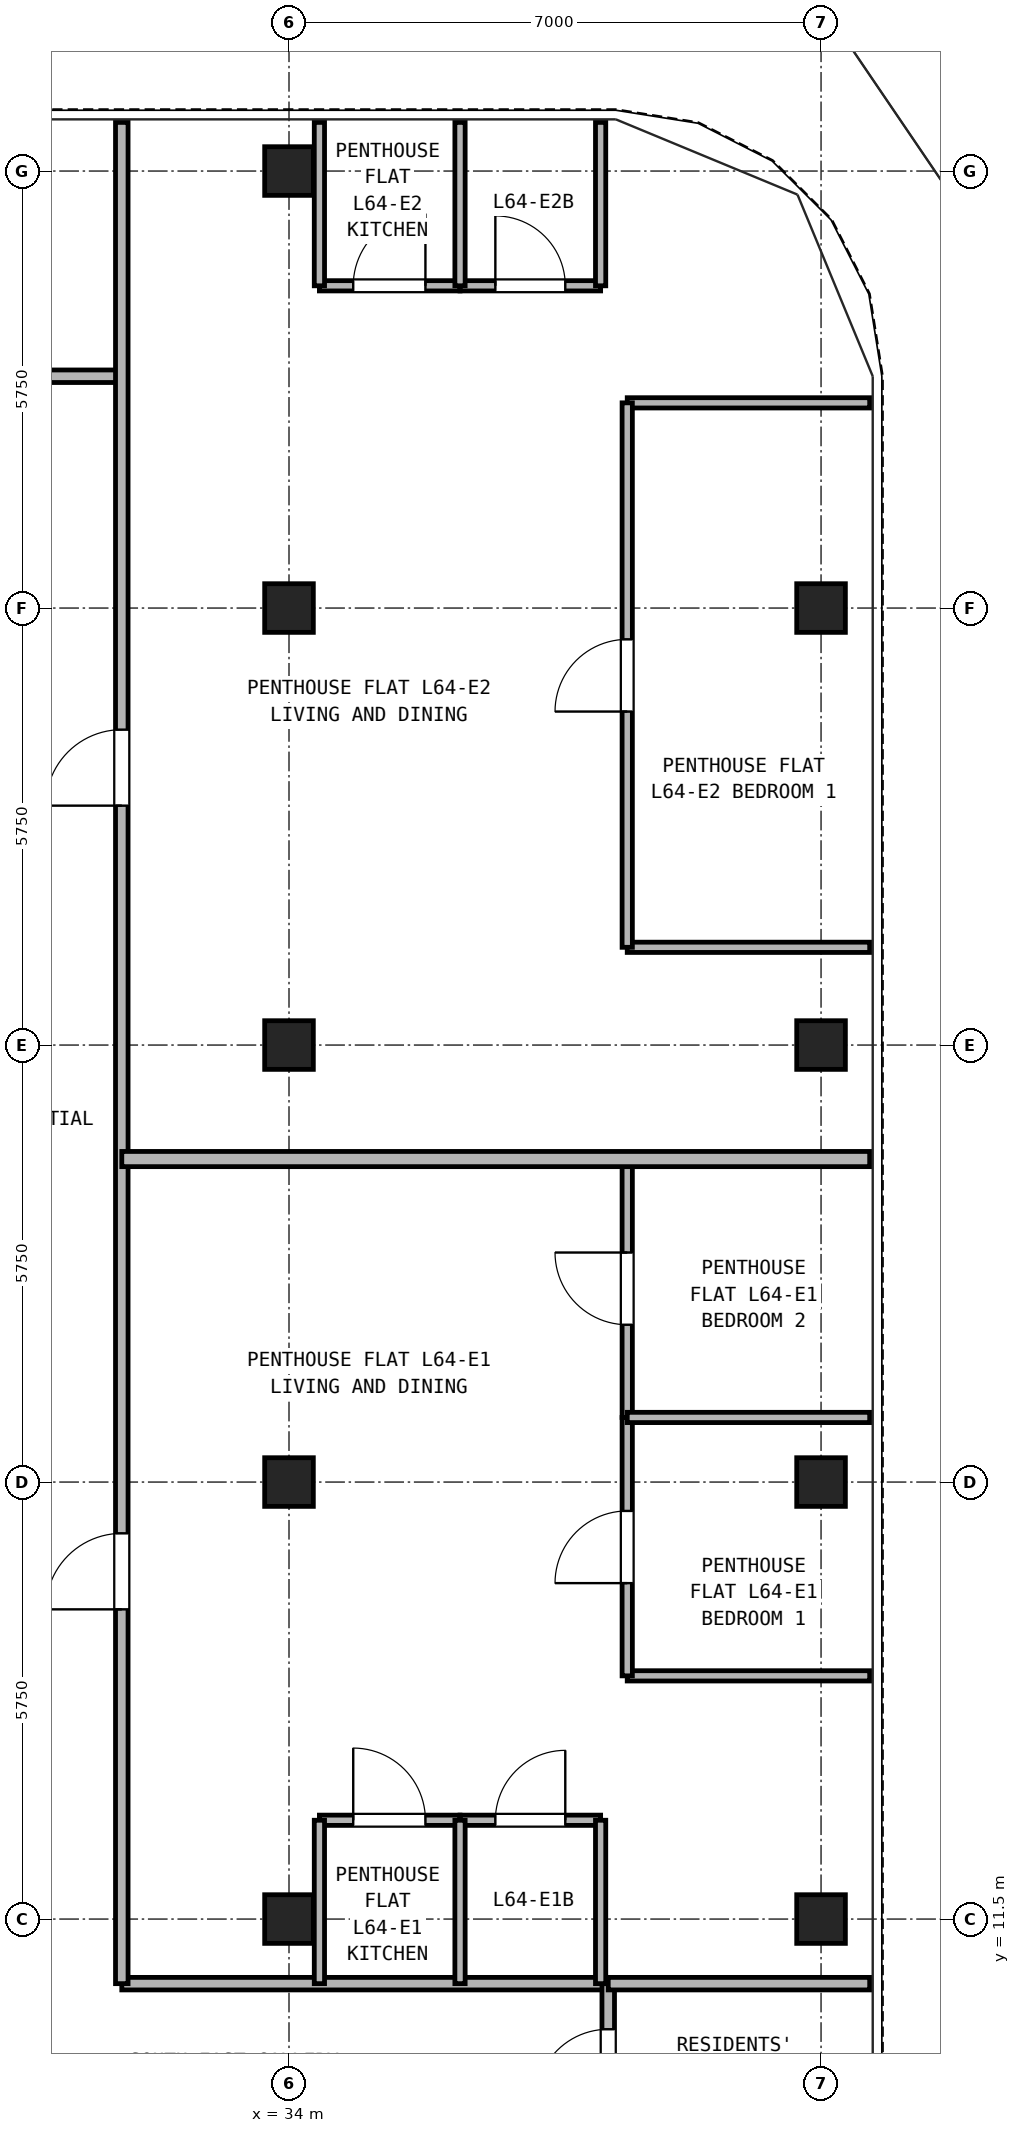
"""IFC4 building model, lengths in metres.
Left out: names, types, materials, properties, quantities, classifications, styles, units other than length and angle.
Written with IfcOpenShell. Run it as: python <this file> out.ifc"""

import sys

from ifc_helpers import new_model, si_unit, direction, frame, frame_2d, origin, origin_2d, place, context, subcontext, project, spatial, rectangle, hollow_rectangle, extrude, source, transform, mapped, element, fill, save


model = new_model("IFC4")
c1 = context("Model", 3, precision=1e-05, world=origin(), true_north=direction((0.0, 1.0)))
c2 = subcontext(c1, "Body", "Model", "MODEL_VIEW")
j1 = project(units=[si_unit("LENGTHUNIT", "METRE"), si_unit("PLANEANGLEUNIT", "RADIAN")], contexts=[c1])
p1 = place(None, origin())
s1 = spatial("IfcSite", under=j1, at=p1, CompositionType="ELEMENT")
p2 = place(p1, origin())
s2 = spatial("IfcBuilding", under=s1, at=p2, CompositionType="ELEMENT")
p3 = place(p2, frame((0.0, 0.0, 226.5)))
s3 = spatial("IfcBuildingStorey", under=s2, at=p3, CompositionType="ELEMENT", Elevation=226.5)
m1 = source(origin(), c2, "Body", "SweptSolid", [
    extrude(hollow_rectangle(XDim=0.64, YDim=0.64, WallThickness=0.035, at=origin_2d()), origin(), (0.0, 0.0, 1.0), 2.98),
])
for number, where, z_axis, x_axis in (
    (1, (34.0, 34.5, 0.0), (0.0, 0.0, 1.0), (1.0, 0.0, 0.0)),
    (2, (41.0, 11.5, 0.0), (0.0, 0.0, 1.0), (1.0, 0.0, 0.0)),
    (3, (41.0, 17.25, 0.0), (0.0, 0.0, 1.0), (1.0, 0.0, 0.0)),
    (4, (41.0, 23.0, 0.0), (0.0, 0.0, 1.0), (1.0, 0.0, 0.0)),
    (5, (41.0, 28.75, 0.0), (0.0, 0.0, 1.0), (1.0, 0.0, 0.0)),
    (6, (34.0, 11.5, 0.0), (0.0, 0.0, 1.0), (1.0, 0.0, 0.0)),
    (7, (34.0, 17.25, 0.0), (0.0, 0.0, 1.0), (1.0, 0.0, 0.0)),
    (8, (34.0, 23.0, 0.0), (0.0, 0.0, 1.0), (1.0, 0.0, 0.0)),
    (9, (34.0, 28.75, 0.0), (0.0, 0.0, 1.0), (1.0, 0.0, 0.0)),
):
    element("IfcColumn", number, at=place(p3, frame(where, z_axis=z_axis, x_axis=x_axis)), inside=s3, PredefinedType="COLUMN", context=c2, shape_type="MappedRepresentation", body=[
        mapped(m1, transform((0.0, 0.0, 0.0), x_axis=(1.0, 0.0, 0.0), y_axis=(0.0, 1.0, 0.0), z_axis=(0.0, 0.0, 1.0), scale=1.0)),
    ])
p4 = place(p3, frame((31.8, 10.65, 0.0), z_axis=(0.0, 0.0, 1.0), x_axis=(1.0, 0.0, 0.0)))
e10 = element("IfcWall", 10, at=p4, inside=s3, PredefinedType="PARTITIONING", context=c2, shape_type="SweptSolid", body=[
    extrude(rectangle(XDim=6.4, YDim=0.165, at=frame_2d((3.2, 0.0))), origin(), (0.0, 0.0, 1.0), 2.98),
])
p5 = place(p3, frame((38.2, 8.65, 0.0), z_axis=(0.0, 0.0, 1.0), x_axis=(0.0, 1.0, 0.0)))
e11 = element("IfcWall", 11, at=p5, inside=s3, PredefinedType="PARTITIONING", context=c2, shape_type="SweptSolid", body=[
    extrude(rectangle(XDim=2.0, YDim=0.165, at=frame_2d((1.0, 0.0))), origin(), (0.0, 0.0, 1.0), 2.98),
])
p6 = place(p5, frame((0.45, 0.0, 0.0)))
e12 = element("IfcOpeningElement", 12, at=p6, cuts=e11, PredefinedType="OPENING", context=c2, shape_type="SweptSolid", body=[
    extrude(rectangle(XDim=0.95, YDim=2.15, at=frame_2d((0.475, 1.075))), frame((0.0, 0.093, 0.0), z_axis=(0.0, -1.0, 0.0), x_axis=(1.0, 0.0, 0.0)), (0.0, 0.0, 1.0), 0.185),
])
p7 = place(p3, frame((15.2, 31.8, 0.0), z_axis=(0.0, 0.0, 1.0), x_axis=(1.0, 0.0, 0.0)))
e13 = element("IfcWall", 13, at=p7, inside=s3, PredefinedType="PARTITIONING", context=c2, shape_type="SweptSolid", body=[
    extrude(rectangle(XDim=16.6, YDim=0.165, at=frame_2d((8.3, 0.0))), origin(), (0.0, 0.0, 1.0), 2.655),
])
p8 = place(p7, frame((3.65, 0.0, 0.0)))
e14 = element("IfcOpeningElement", 14, at=p8, cuts=e13, PredefinedType="OPENING", context=c2, shape_type="SweptSolid", body=[
    extrude(rectangle(XDim=0.95, YDim=2.15, at=frame_2d((0.475, 1.075))), frame((0.0, 0.093, 0.0), z_axis=(0.0, -1.0, 0.0), x_axis=(1.0, 0.0, 0.0)), (0.0, 0.0, 1.0), 0.185),
])
p9 = place(p7, frame((9.1, 0.0, 0.0)))
e15 = element("IfcOpeningElement", 15, at=p9, cuts=e13, PredefinedType="OPENING", context=c2, shape_type="SweptSolid", body=[
    extrude(rectangle(XDim=0.95, YDim=2.15, at=frame_2d((0.475, 1.075))), frame((0.0, 0.093, 0.0), z_axis=(0.0, -1.0, 0.0), x_axis=(1.0, 0.0, 0.0)), (0.0, 0.0, 1.0), 0.185),
])
p10 = place(p7, frame((13.25, 0.0, 0.0)))
e16 = element("IfcOpeningElement", 16, at=p10, cuts=e13, PredefinedType="OPENING", context=c2, shape_type="SweptSolid", body=[
    extrude(rectangle(XDim=0.92, YDim=2.1, at=frame_2d((0.46, 1.05))), frame((0.0, 0.093, 0.0), z_axis=(0.0, -1.0, 0.0), x_axis=(1.0, 0.0, 0.0)), (0.0, 0.0, 1.0), 0.185),
])
p11 = place(p3, frame((31.8, 10.65, 0.0), z_axis=(0.0, 0.0, 1.0), x_axis=(0.0, 1.0, 0.0)))
e17 = element("IfcWall", 17, at=p11, inside=s3, PredefinedType="PARTITIONING", context=c2, shape_type="SweptSolid", body=[
    extrude(rectangle(XDim=24.49, YDim=0.165, at=frame_2d((12.245, 0.0))), origin(), (0.0, 0.0, 1.0), 2.98),
])
p12 = place(p11, frame((4.925, 0.0, 0.0)))
e18 = element("IfcOpeningElement", 18, at=p12, cuts=e17, PredefinedType="OPENING", context=c2, shape_type="SweptSolid", body=[
    extrude(rectangle(XDim=1.0, YDim=2.15, at=frame_2d((0.5, 1.075))), frame((0.0, 0.093, 0.0), z_axis=(0.0, -1.0, 0.0), x_axis=(1.0, 0.0, 0.0)), (0.0, 0.0, 1.0), 0.185),
])
p13 = place(p11, frame((15.5, 0.0, 0.0)))
e19 = element("IfcOpeningElement", 19, at=p13, cuts=e17, PredefinedType="OPENING", context=c2, shape_type="SweptSolid", body=[
    extrude(rectangle(XDim=1.0, YDim=2.15, at=frame_2d((0.5, 1.075))), frame((0.0, 0.093, 0.0), z_axis=(0.0, -1.0, 0.0), x_axis=(1.0, 0.0, 0.0)), (0.0, 0.0, 1.0), 0.185),
])
p14 = place(p3, frame((38.2, 10.65, 0.0), z_axis=(0.0, 0.0, 1.0), x_axis=(1.0, 0.0, 0.0)))
e20 = element("IfcWall", 20, at=p14, inside=s3, PredefinedType="PARTITIONING", context=c2, shape_type="SweptSolid", body=[
    extrude(rectangle(XDim=3.44, YDim=0.165, at=frame_2d((1.72, 0.0))), origin(), (0.0, 0.0, 1.0), 2.98),
])
p15 = place(p3, frame((34.4, 12.8, 0.0), z_axis=(0.0, 0.0, 1.0), x_axis=(1.0, 0.0, 0.0)))
e21 = element("IfcWall", 21, at=p15, inside=s3, PredefinedType="PARTITIONING", context=c2, shape_type="SweptSolid", body=[
    extrude(rectangle(XDim=1.85, YDim=0.135, at=frame_2d((0.925, 0.0))), origin(), (0.0, 0.0, 1.0), 2.98),
])
p16 = place(p15, frame((0.445, 0.0, 0.0)))
e22 = element("IfcOpeningElement", 22, at=p16, cuts=e21, PredefinedType="OPENING", context=c2, shape_type="SweptSolid", body=[
    extrude(rectangle(XDim=0.95, YDim=2.15, at=frame_2d((0.475, 1.075))), frame((0.0, 0.077, 0.0), z_axis=(0.0, -1.0, 0.0), x_axis=(1.0, 0.0, 0.0)), (0.0, 0.0, 1.0), 0.155),
])
p17 = place(p3, frame((36.25, 12.8, 0.0), z_axis=(0.0, 0.0, 1.0), x_axis=(1.0, 0.0, 0.0)))
e23 = element("IfcWall", 23, at=p17, inside=s3, PredefinedType="PARTITIONING", context=c2, shape_type="SweptSolid", body=[
    extrude(rectangle(XDim=1.85, YDim=0.135, at=frame_2d((0.925, 0.0))), origin(), (0.0, 0.0, 1.0), 2.98),
])
p18 = place(p17, frame((0.465, 0.0, 0.0)))
e24 = element("IfcOpeningElement", 24, at=p18, cuts=e23, PredefinedType="OPENING", context=c2, shape_type="SweptSolid", body=[
    extrude(rectangle(XDim=0.92, YDim=2.1, at=frame_2d((0.46, 1.05))), frame((0.0, 0.077, 0.0), z_axis=(0.0, -1.0, 0.0), x_axis=(1.0, 0.0, 0.0)), (0.0, 0.0, 1.0), 0.155),
])
for number, where, z_axis, x_axis in (
    (25, (34.4, 10.65, 0.0), (0.0, 0.0, 1.0), (0.0, 1.0, 0.0)),
    (26, (36.25, 10.65, 0.0), (0.0, 0.0, 1.0), (0.0, 1.0, 0.0)),
    (27, (38.1, 10.65, 0.0), (0.0, 0.0, 1.0), (0.0, 1.0, 0.0)),
):
    element("IfcWall", number, at=place(p3, frame(where, z_axis=z_axis, x_axis=x_axis)), inside=s3, PredefinedType="PARTITIONING", context=c2, shape_type="SweptSolid", body=[
        extrude(rectangle(XDim=2.15, YDim=0.135, at=frame_2d((1.075, 0.0))), origin(), (0.0, 0.0, 1.0), 2.98),
    ])
p19 = place(p3, frame((38.45, 14.7, 0.0), z_axis=(0.0, 0.0, 1.0), x_axis=(1.0, 0.0, 0.0)))
e28 = element("IfcWall", 28, at=p19, inside=s3, PredefinedType="PARTITIONING", context=c2, shape_type="SweptSolid", body=[
    extrude(rectangle(XDim=3.19, YDim=0.135, at=frame_2d((1.595, 0.0))), origin(), (0.0, 0.0, 1.0), 2.98),
])
p20 = place(p3, frame((38.45, 14.7, 0.0), z_axis=(0.0, 0.0, 1.0), x_axis=(0.0, 1.0, 0.0)))
e29 = element("IfcWall", 29, at=p20, inside=s3, PredefinedType="PARTITIONING", context=c2, shape_type="SweptSolid", body=[
    extrude(rectangle(XDim=3.4, YDim=0.135, at=frame_2d((1.7, 0.0))), origin(), (0.0, 0.0, 1.0), 2.98),
])
p21 = place(p20, frame((1.22, 0.0, 0.0)))
e30 = element("IfcOpeningElement", 30, at=p21, cuts=e29, PredefinedType="OPENING", context=c2, shape_type="SweptSolid", body=[
    extrude(rectangle(XDim=0.95, YDim=2.15, at=frame_2d((0.475, 1.075))), frame((0.0, 0.077, 0.0), z_axis=(0.0, -1.0, 0.0), x_axis=(1.0, 0.0, 0.0)), (0.0, 0.0, 1.0), 0.155),
])
p22 = place(p3, frame((38.45, 18.1, 0.0), z_axis=(0.0, 0.0, 1.0), x_axis=(0.0, 1.0, 0.0)))
e31 = element("IfcWall", 31, at=p22, inside=s3, PredefinedType="PARTITIONING", context=c2, shape_type="SweptSolid", body=[
    extrude(rectangle(XDim=3.4, YDim=0.135, at=frame_2d((1.7, 0.0))), origin(), (0.0, 0.0, 1.0), 2.98),
])
p23 = place(p22, frame((1.22, 0.0, 0.0)))
e32 = element("IfcOpeningElement", 32, at=p23, cuts=e31, PredefinedType="OPENING", context=c2, shape_type="SweptSolid", body=[
    extrude(rectangle(XDim=0.95, YDim=2.15, at=frame_2d((0.475, 1.075))), frame((0.0, 0.077, 0.0), z_axis=(0.0, -1.0, 0.0), x_axis=(1.0, 0.0, 0.0)), (0.0, 0.0, 1.0), 0.155),
])
p24 = place(p3, frame((38.45, 18.1, 0.0), z_axis=(0.0, 0.0, 1.0), x_axis=(1.0, 0.0, 0.0)))
e33 = element("IfcWall", 33, at=p24, inside=s3, PredefinedType="PARTITIONING", context=c2, shape_type="SweptSolid", body=[
    extrude(rectangle(XDim=3.19, YDim=0.135, at=frame_2d((1.595, 0.0))), origin(), (0.0, 0.0, 1.0), 2.98),
])
p25 = place(p3, frame((31.8, 21.5, 0.0), z_axis=(0.0, 0.0, 1.0), x_axis=(1.0, 0.0, 0.0)))
e34 = element("IfcWall", 34, at=p25, inside=s3, PredefinedType="PARTITIONING", context=c2, shape_type="SweptSolid", body=[
    extrude(rectangle(XDim=9.84, YDim=0.2, at=frame_2d((4.92, 0.0))), origin(), (0.0, 0.0, 1.0), 2.98),
])
p26 = place(p3, frame((34.4, 32.99, 0.0), z_axis=(0.0, 0.0, 1.0), x_axis=(1.0, 0.0, 0.0)))
e35 = element("IfcWall", 35, at=p26, inside=s3, PredefinedType="PARTITIONING", context=c2, shape_type="SweptSolid", body=[
    extrude(rectangle(XDim=1.85, YDim=0.135, at=frame_2d((0.925, 0.0))), origin(), (0.0, 0.0, 1.0), 2.98),
])
p27 = place(p26, frame((0.445, 0.0, 0.0)))
e36 = element("IfcOpeningElement", 36, at=p27, cuts=e35, PredefinedType="OPENING", context=c2, shape_type="SweptSolid", body=[
    extrude(rectangle(XDim=0.95, YDim=2.15, at=frame_2d((0.475, 1.075))), frame((0.0, 0.077, 0.0), z_axis=(0.0, -1.0, 0.0), x_axis=(1.0, 0.0, 0.0)), (0.0, 0.0, 1.0), 0.155),
])
p28 = place(p3, frame((36.25, 32.99, 0.0), z_axis=(0.0, 0.0, 1.0), x_axis=(1.0, 0.0, 0.0)))
e37 = element("IfcWall", 37, at=p28, inside=s3, PredefinedType="PARTITIONING", context=c2, shape_type="SweptSolid", body=[
    extrude(rectangle(XDim=1.85, YDim=0.135, at=frame_2d((0.925, 0.0))), origin(), (0.0, 0.0, 1.0), 2.98),
])
p29 = place(p28, frame((0.465, 0.0, 0.0)))
e38 = element("IfcOpeningElement", 38, at=p29, cuts=e37, PredefinedType="OPENING", context=c2, shape_type="SweptSolid", body=[
    extrude(rectangle(XDim=0.92, YDim=2.1, at=frame_2d((0.46, 1.05))), frame((0.0, 0.077, 0.0), z_axis=(0.0, -1.0, 0.0), x_axis=(1.0, 0.0, 0.0)), (0.0, 0.0, 1.0), 0.155),
])
for number, where, z_axis, x_axis in (
    (39, (34.4, 32.99, 0.0), (0.0, 0.0, 1.0), (0.0, 1.0, 0.0)),
    (40, (36.25, 32.99, 0.0), (0.0, 0.0, 1.0), (0.0, 1.0, 0.0)),
    (41, (38.1, 32.99, 0.0), (0.0, 0.0, 1.0), (0.0, 1.0, 0.0)),
):
    element("IfcWall", number, at=place(p3, frame(where, z_axis=z_axis, x_axis=x_axis)), inside=s3, PredefinedType="PARTITIONING", context=c2, shape_type="SweptSolid", body=[
        extrude(rectangle(XDim=2.15, YDim=0.135, at=frame_2d((1.075, 0.0))), origin(), (0.0, 0.0, 1.0), 2.98),
    ])
for number, where, z_axis, x_axis in (
    (42, (38.45, 24.286, 0.0), (0.0, 0.0, 1.0), (1.0, 0.0, 0.0)),
    (43, (38.45, 31.45, 0.0), (0.0, 0.0, 1.0), (1.0, 0.0, 0.0)),
):
    element("IfcWall", number, at=place(p3, frame(where, z_axis=z_axis, x_axis=x_axis)), inside=s3, PredefinedType="PARTITIONING", context=c2, shape_type="SweptSolid", body=[
        extrude(rectangle(XDim=3.19, YDim=0.135, at=frame_2d((1.595, 0.0))), origin(), (0.0, 0.0, 1.0), 2.98),
    ])
p30 = place(p3, frame((38.45, 24.286, 0.0), z_axis=(0.0, 0.0, 1.0), x_axis=(0.0, 1.0, 0.0)))
e44 = element("IfcWall", 44, at=p30, inside=s3, PredefinedType="PARTITIONING", context=c2, shape_type="SweptSolid", body=[
    extrude(rectangle(XDim=7.164, YDim=0.135, at=frame_2d((3.582, 0.0))), origin(), (0.0, 0.0, 1.0), 2.98),
])
p31 = place(p30, frame((3.102, 0.0, 0.0)))
e45 = element("IfcOpeningElement", 45, at=p31, cuts=e44, PredefinedType="OPENING", context=c2, shape_type="SweptSolid", body=[
    extrude(rectangle(XDim=0.95, YDim=2.15, at=frame_2d((0.475, 1.075))), frame((0.0, 0.077, 0.0), z_axis=(0.0, -1.0, 0.0), x_axis=(1.0, 0.0, 0.0)), (0.0, 0.0, 1.0), 0.155),
])
p32 = place(p6, origin())
e46 = element("IfcDoor", 46, at=p32, inside=s3, OperationType="SINGLE_SWING_LEFT", PredefinedType="DOOR", context=c2, shape_type="SweptSolid", body=[
    extrude(rectangle(XDim=0.95, YDim=2.15, at=frame_2d((0.475, 1.075))), frame((0.0, 0.025, 0.0), z_axis=(0.0, -1.0, 0.0), x_axis=(1.0, 0.0, 0.0)), (0.0, 0.0, 1.0), 0.05),
])
fill(e12, e46)
p33 = place(p16, origin())
e47 = element("IfcDoor", 47, at=p33, inside=s3, OperationType="SINGLE_SWING_LEFT", PredefinedType="DOOR", context=c2, shape_type="SweptSolid", body=[
    extrude(rectangle(XDim=0.95, YDim=2.15, at=frame_2d((0.475, 1.075))), frame((0.0, 0.025, 0.0), z_axis=(0.0, -1.0, 0.0), x_axis=(1.0, 0.0, 0.0)), (0.0, 0.0, 1.0), 0.05),
])
fill(e22, e47)
p34 = place(p18, origin())
e48 = element("IfcDoor", 48, at=p34, inside=s3, OperationType="SINGLE_SWING_RIGHT", PredefinedType="DOOR", context=c2, shape_type="SweptSolid", body=[
    extrude(rectangle(XDim=0.92, YDim=2.1, at=frame_2d((0.46, 1.05))), frame((0.0, 0.025, 0.0), z_axis=(0.0, -1.0, 0.0), x_axis=(1.0, 0.0, 0.0)), (0.0, 0.0, 1.0), 0.05),
])
fill(e24, e48)
p35 = place(p21, frame((0.95, 0.0, 0.0), z_axis=(0.0, 0.0, 1.0), x_axis=(-1.0, 0.0, 0.0)))
e49 = element("IfcDoor", 49, at=p35, inside=s3, OperationType="SINGLE_SWING_LEFT", PredefinedType="DOOR", context=c2, shape_type="SweptSolid", body=[
    extrude(rectangle(XDim=0.95, YDim=2.15, at=frame_2d((0.475, 1.075))), frame((0.0, 0.025, 0.0), z_axis=(0.0, -1.0, 0.0), x_axis=(1.0, 0.0, 0.0)), (0.0, 0.0, 1.0), 0.05),
])
fill(e30, e49)
p36 = place(p23, frame((0.95, 0.0, 0.0), z_axis=(0.0, 0.0, 1.0), x_axis=(-1.0, 0.0, 0.0)))
e50 = element("IfcDoor", 50, at=p36, inside=s3, OperationType="SINGLE_SWING_RIGHT", PredefinedType="DOOR", context=c2, shape_type="SweptSolid", body=[
    extrude(rectangle(XDim=0.95, YDim=2.15, at=frame_2d((0.475, 1.075))), frame((0.0, 0.025, 0.0), z_axis=(0.0, -1.0, 0.0), x_axis=(1.0, 0.0, 0.0)), (0.0, 0.0, 1.0), 0.05),
])
fill(e32, e50)
p37 = place(p12, frame((1.0, 0.0, 0.0), z_axis=(0.0, 0.0, 1.0), x_axis=(-1.0, 0.0, 0.0)))
e51 = element("IfcDoor", 51, at=p37, inside=s3, OperationType="SINGLE_SWING_LEFT", PredefinedType="DOOR", context=c2, shape_type="SweptSolid", body=[
    extrude(rectangle(XDim=1.0, YDim=2.15, at=frame_2d((0.5, 1.075))), frame((0.0, 0.025, 0.0), z_axis=(0.0, -1.0, 0.0), x_axis=(1.0, 0.0, 0.0)), (0.0, 0.0, 1.0), 0.05),
])
fill(e18, e51)
p38 = place(p27, frame((0.95, 0.0, 0.0), z_axis=(0.0, 0.0, 1.0), x_axis=(-1.0, 0.0, 0.0)))
e52 = element("IfcDoor", 52, at=p38, inside=s3, OperationType="SINGLE_SWING_RIGHT", PredefinedType="DOOR", context=c2, shape_type="SweptSolid", body=[
    extrude(rectangle(XDim=0.95, YDim=2.15, at=frame_2d((0.475, 1.075))), frame((0.0, 0.025, 0.0), z_axis=(0.0, -1.0, 0.0), x_axis=(1.0, 0.0, 0.0)), (0.0, 0.0, 1.0), 0.05),
])
fill(e36, e52)
p39 = place(p29, frame((0.92, 0.0, 0.0), z_axis=(0.0, 0.0, 1.0), x_axis=(-1.0, 0.0, 0.0)))
e53 = element("IfcDoor", 53, at=p39, inside=s3, OperationType="SINGLE_SWING_LEFT", PredefinedType="DOOR", context=c2, shape_type="SweptSolid", body=[
    extrude(rectangle(XDim=0.92, YDim=2.1, at=frame_2d((0.46, 1.05))), frame((0.0, 0.025, 0.0), z_axis=(0.0, -1.0, 0.0), x_axis=(1.0, 0.0, 0.0)), (0.0, 0.0, 1.0), 0.05),
])
fill(e38, e53)
p40 = place(p31, frame((0.95, 0.0, 0.0), z_axis=(0.0, 0.0, 1.0), x_axis=(-1.0, 0.0, 0.0)))
e54 = element("IfcDoor", 54, at=p40, inside=s3, OperationType="SINGLE_SWING_LEFT", PredefinedType="DOOR", context=c2, shape_type="SweptSolid", body=[
    extrude(rectangle(XDim=0.95, YDim=2.15, at=frame_2d((0.475, 1.075))), frame((0.0, 0.025, 0.0), z_axis=(0.0, -1.0, 0.0), x_axis=(1.0, 0.0, 0.0)), (0.0, 0.0, 1.0), 0.05),
])
fill(e45, e54)
p41 = place(p13, frame((1.0, 0.0, 0.0), z_axis=(0.0, 0.0, 1.0), x_axis=(-1.0, 0.0, 0.0)))
e55 = element("IfcDoor", 55, at=p41, inside=s3, OperationType="SINGLE_SWING_LEFT", PredefinedType="DOOR", context=c2, shape_type="SweptSolid", body=[
    extrude(rectangle(XDim=1.0, YDim=2.15, at=frame_2d((0.5, 1.075))), frame((0.0, 0.025, 0.0), z_axis=(0.0, -1.0, 0.0), x_axis=(1.0, 0.0, 0.0)), (0.0, 0.0, 1.0), 0.05),
])
fill(e19, e55)
save(model, sys.argv[1])
